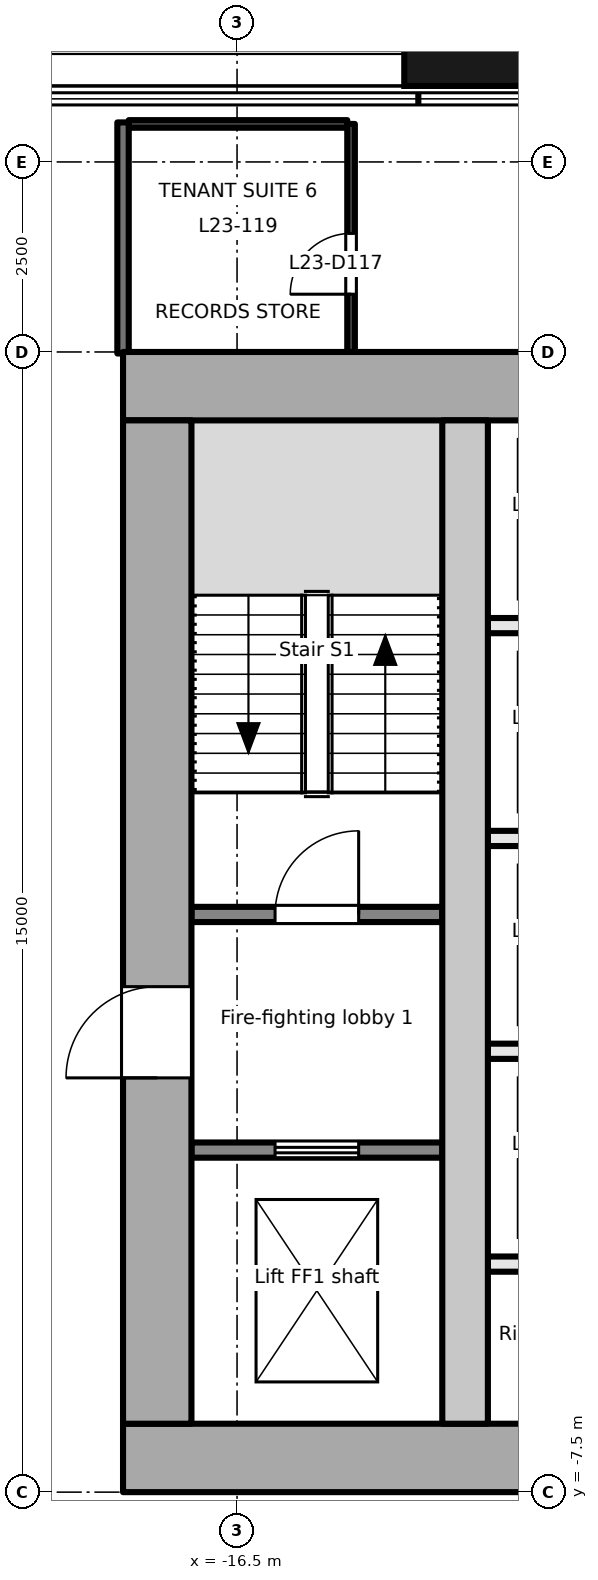
"""IFC4 building model, lengths in metres.
Left out: names, types, materials, properties, quantities, classifications, styles, units other than length and angle.
Written with IfcOpenShell. Run it as: python <this file> out.ifc"""

import sys

from ifc_helpers import new_model, si_unit, direction, frame, frame_2d, origin, origin_2d, place, context, subcontext, project, spatial, rectangle, extrude, element, fill, save


model = new_model("IFC4")
c1 = context("Model", 3, precision=1e-05, world=origin(), true_north=direction((0.0, 1.0)))
c2 = subcontext(c1, "Body", "Model", "MODEL_VIEW")
j1 = project(units=[si_unit("LENGTHUNIT", "METRE"), si_unit("PLANEANGLEUNIT", "RADIAN")], contexts=[c1])
p1 = place(None, origin())
s1 = spatial("IfcSite", under=j1, at=p1, CompositionType="ELEMENT")
p2 = place(p1, origin())
s2 = spatial("IfcBuilding", under=s1, at=p2, CompositionType="ELEMENT")
p3 = place(p2, frame((0.0, 0.0, 103.7)))
s3 = spatial("IfcBuildingStorey", under=s2, at=p3, CompositionType="ELEMENT", Elevation=103.7)
p4 = place(p3, frame((-13.5, 11.9, -0.2), z_axis=(0.0, 0.0, 1.0), x_axis=(1.0, 0.0, 0.0)))
e1 = element("IfcColumn", 1, at=p4, inside=s3, PredefinedType="COLUMN", context=c2, shape_type="SweptSolid", body=[
    extrude(rectangle(XDim=1.6, YDim=1.8, at=origin_2d()), origin(), (0.0, 0.0, 1.0), 4.0),
])
p5 = place(p3, frame((-18.0, -7.05, -0.2), z_axis=(0.0, 0.0, 1.0), x_axis=(1.0, 0.0, 0.0)))
e2 = element("IfcWall", 2, at=p5, inside=s3, PredefinedType="SHEAR", context=c2, shape_type="SweptSolid", body=[
    extrude(rectangle(XDim=36.0, YDim=0.9, at=frame_2d((18.0, 0.0))), origin(), (0.0, 0.0, 1.0), 4.0),
])
p6 = place(p5, frame((7.8, 0.0, 0.2)))
e3 = element("IfcOpeningElement", 3, at=p6, cuts=e2, PredefinedType="OPENING", context=c2, shape_type="SweptSolid", body=[
    extrude(rectangle(XDim=2.4, YDim=2.1, at=frame_2d((1.2, 1.05))), frame((0.0, 0.46, 0.0), z_axis=(0.0, -1.0, 0.0), x_axis=(1.0, 0.0, 0.0)), (0.0, 0.0, 1.0), 0.921),
])
p7 = place(p5, frame((17.4, 0.0, 0.2)))
e4 = element("IfcOpeningElement", 4, at=p7, cuts=e2, PredefinedType="OPENING", context=c2, shape_type="SweptSolid", body=[
    extrude(rectangle(XDim=1.2, YDim=2.1, at=frame_2d((0.6, 1.05))), frame((0.0, 0.46, 0.0), z_axis=(0.0, -1.0, 0.0), x_axis=(1.0, 0.0, 0.0)), (0.0, 0.0, 1.0), 0.921),
])
p8 = place(p5, frame((26.1, 0.0, 0.2)))
e5 = element("IfcOpeningElement", 5, at=p8, cuts=e2, PredefinedType="OPENING", context=c2, shape_type="SweptSolid", body=[
    extrude(rectangle(XDim=2.4, YDim=2.1, at=frame_2d((1.2, 1.05))), frame((0.0, 0.46, 0.0), z_axis=(0.0, -1.0, 0.0), x_axis=(1.0, 0.0, 0.0)), (0.0, 0.0, 1.0), 0.921),
])
p9 = place(p3, frame((-18.0, 7.05, -0.2), z_axis=(0.0, 0.0, 1.0), x_axis=(1.0, 0.0, 0.0)))
e6 = element("IfcWall", 6, at=p9, inside=s3, PredefinedType="SHEAR", context=c2, shape_type="SweptSolid", body=[
    extrude(rectangle(XDim=36.0, YDim=0.9, at=frame_2d((18.0, 0.0))), origin(), (0.0, 0.0, 1.0), 4.0),
])
p10 = place(p3, frame((-17.55, -6.6, -0.2), z_axis=(0.0, 0.0, 1.0), x_axis=(0.0, 1.0, 0.0)))
e7 = element("IfcWall", 7, at=p10, inside=s3, PredefinedType="SHEAR", context=c2, shape_type="SweptSolid", body=[
    extrude(rectangle(XDim=13.2, YDim=0.9, at=frame_2d((6.6, 0.0))), origin(), (0.0, 0.0, 1.0), 4.0),
])
p11 = place(p10, frame((4.55, 0.0, 0.2)))
e8 = element("IfcOpeningElement", 8, at=p11, cuts=e7, PredefinedType="OPENING", context=c2, shape_type="SweptSolid", body=[
    extrude(rectangle(XDim=1.2, YDim=2.1, at=frame_2d((0.6, 1.05))), frame((0.0, 0.46, 0.0), z_axis=(0.0, -1.0, 0.0), x_axis=(1.0, 0.0, 0.0)), (0.0, 0.0, 1.0), 0.921),
])
p12 = place(p3, frame((-13.5, -6.6, -0.2), z_axis=(0.0, 0.0, 1.0), x_axis=(0.0, 1.0, 0.0)))
e9 = element("IfcWall", 9, at=p12, inside=s3, PredefinedType="SHEAR", context=c2, shape_type="SweptSolid", body=[
    extrude(rectangle(XDim=13.2, YDim=0.6, at=frame_2d((6.6, 0.0))), origin(), (0.0, 0.0, 1.0), 4.0),
])
p13 = place(p3, frame((-17.1, -3.0, 0.0), z_axis=(0.0, 0.0, 1.0), x_axis=(1.0, 0.0, 0.0)))
e10 = element("IfcWall", 10, at=p13, inside=s3, PredefinedType="PARTITIONING", context=c2, shape_type="SweptSolid", body=[
    extrude(rectangle(XDim=3.3, YDim=0.2, at=frame_2d((1.65, 0.0))), origin(), (0.0, 0.0, 1.0), 3.8),
])
p14 = place(p13, frame((1.1, 0.0, 0.0)))
e11 = element("IfcOpeningElement", 11, at=p14, cuts=e10, PredefinedType="OPENING", context=c2, shape_type="SweptSolid", body=[
    extrude(rectangle(XDim=1.1, YDim=2.1, at=frame_2d((0.55, 1.05))), frame((0.0, 0.111, 0.0), z_axis=(0.0, -1.0, 0.0), x_axis=(1.0, 0.0, 0.0)), (0.0, 0.0, 1.0), 0.221),
])
p15 = place(p3, frame((-17.1, 0.1, 0.0), z_axis=(0.0, 0.0, 1.0), x_axis=(1.0, 0.0, 0.0)))
e12 = element("IfcWall", 12, at=p15, inside=s3, PredefinedType="PARTITIONING", context=c2, shape_type="SweptSolid", body=[
    extrude(rectangle(XDim=3.3, YDim=0.2, at=frame_2d((1.65, 0.0))), origin(), (0.0, 0.0, 1.0), 3.8),
])
p16 = place(p15, frame((1.1, 0.0, 0.0)))
e13 = element("IfcOpeningElement", 13, at=p16, cuts=e12, PredefinedType="OPENING", context=c2, shape_type="SweptSolid", body=[
    extrude(rectangle(XDim=1.1, YDim=2.1, at=frame_2d((0.55, 1.05))), frame((0.0, 0.111, 0.0), z_axis=(0.0, -1.0, 0.0), x_axis=(1.0, 0.0, 0.0)), (0.0, 0.0, 1.0), 0.221),
])
for number, where, z_axis, x_axis in (
    (14, (-13.2, -1.7, 0.0), (0.0, 0.0, 1.0), (1.0, 0.0, 0.0)),
    (15, (-13.2, 1.1, 0.0), (0.0, 0.0, 1.0), (1.0, 0.0, 0.0)),
    (16, (-13.2, 3.9, 0.0), (0.0, 0.0, 1.0), (1.0, 0.0, 0.0)),
    (17, (-13.2, -4.5, 0.0), (0.0, 0.0, 1.0), (1.0, 0.0, 0.0)),
):
    element("IfcWall", number, at=place(p3, frame(where, z_axis=z_axis, x_axis=x_axis)), inside=s3, PredefinedType="PARTITIONING", context=c2, shape_type="SweptSolid", body=[
        extrude(rectangle(XDim=2.3, YDim=0.2, at=frame_2d((1.15, 0.0))), origin(), (0.0, 0.0, 1.0), 3.8),
    ])
p17 = place(p3, frame((-18.0, 10.52, 0.0), z_axis=(0.0, 0.0, 1.0), x_axis=(0.0, -1.0, 0.0)))
e18 = element("IfcWall", 18, at=p17, inside=s3, PredefinedType="PARTITIONING", context=c2, shape_type="SweptSolid", body=[
    extrude(rectangle(XDim=3.04, YDim=0.15, at=frame_2d((1.52, 0.0))), origin(), (0.0, 0.0, 1.0), 3.8),
])
p18 = place(p3, frame((-15.05, 10.5, 0.0), z_axis=(0.0, 0.0, 1.0), x_axis=(-1.0, 0.0, 0.0)))
e19 = element("IfcWall", 19, at=p18, inside=s3, PredefinedType="PARTITIONING", context=c2, shape_type="SweptSolid", body=[
    extrude(rectangle(XDim=2.875, YDim=0.1, at=frame_2d((1.438, 0.0))), origin(), (0.0, 0.0, 1.0), 3.8),
])
p19 = place(p3, frame((-15.0, 7.5, 0.0), z_axis=(0.0, 0.0, 1.0), x_axis=(0.0, 1.0, 0.0)))
e20 = element("IfcWall", 20, at=p19, inside=s3, PredefinedType="PARTITIONING", context=c2, shape_type="SweptSolid", body=[
    extrude(rectangle(XDim=3.0, YDim=0.1, at=frame_2d((1.5, 0.0))), origin(), (0.0, 0.0, 1.0), 3.8),
])
p20 = place(p19, frame((0.76, 0.0, 0.0)))
e21 = element("IfcOpeningElement", 21, at=p20, cuts=e20, PredefinedType="OPENING", context=c2, shape_type="SweptSolid", body=[
    extrude(rectangle(XDim=0.8, YDim=2.1, at=frame_2d((0.4, 1.05))), frame((0.0, 0.061, 0.0), z_axis=(0.0, -1.0, 0.0), x_axis=(1.0, 0.0, 0.0)), (0.0, 0.0, 1.0), 0.121),
])
p21 = place(p14, origin())
e22 = element("IfcDoor", 22, at=p21, inside=s3, OperationType="DOUBLE_DOOR_SLIDING", PredefinedType="DOOR", context=c2, shape_type="SweptSolid", body=[
    extrude(rectangle(XDim=1.1, YDim=2.1, at=frame_2d((0.55, 1.05))), frame((0.0, 0.025, 0.0), z_axis=(0.0, -1.0, 0.0), x_axis=(1.0, 0.0, 0.0)), (0.0, 0.0, 1.0), 0.05),
])
fill(e11, e22)
p22 = place(p11, origin())
e23 = element("IfcDoor", 23, at=p22, inside=s3, OperationType="SINGLE_SWING_LEFT", PredefinedType="DOOR", context=c2, shape_type="SweptSolid", body=[
    extrude(rectangle(XDim=1.2, YDim=2.1, at=frame_2d((0.6, 1.05))), frame((0.0, 0.025, 0.0), z_axis=(0.0, -1.0, 0.0), x_axis=(1.0, 0.0, 0.0)), (0.0, 0.0, 1.0), 0.05),
])
fill(e8, e23)
p23 = place(p16, origin())
e24 = element("IfcDoor", 24, at=p23, inside=s3, OperationType="SINGLE_SWING_RIGHT", PredefinedType="DOOR", context=c2, shape_type="SweptSolid", body=[
    extrude(rectangle(XDim=1.1, YDim=2.1, at=frame_2d((0.55, 1.05))), frame((0.0, 0.025, 0.0), z_axis=(0.0, -1.0, 0.0), x_axis=(1.0, 0.0, 0.0)), (0.0, 0.0, 1.0), 0.05),
])
fill(e13, e24)
p24 = place(p20, origin())
e25 = element("IfcDoor", 25, at=p24, inside=s3, OperationType="SINGLE_SWING_LEFT", PredefinedType="DOOR", context=c2, shape_type="SweptSolid", body=[
    extrude(rectangle(XDim=0.8, YDim=2.1, at=frame_2d((0.4, 1.05))), frame((0.0, 0.025, 0.0), z_axis=(0.0, -1.0, 0.0), x_axis=(1.0, 0.0, 0.0)), (0.0, 0.0, 1.0), 0.05),
])
fill(e21, e25)
save(model, sys.argv[1])
